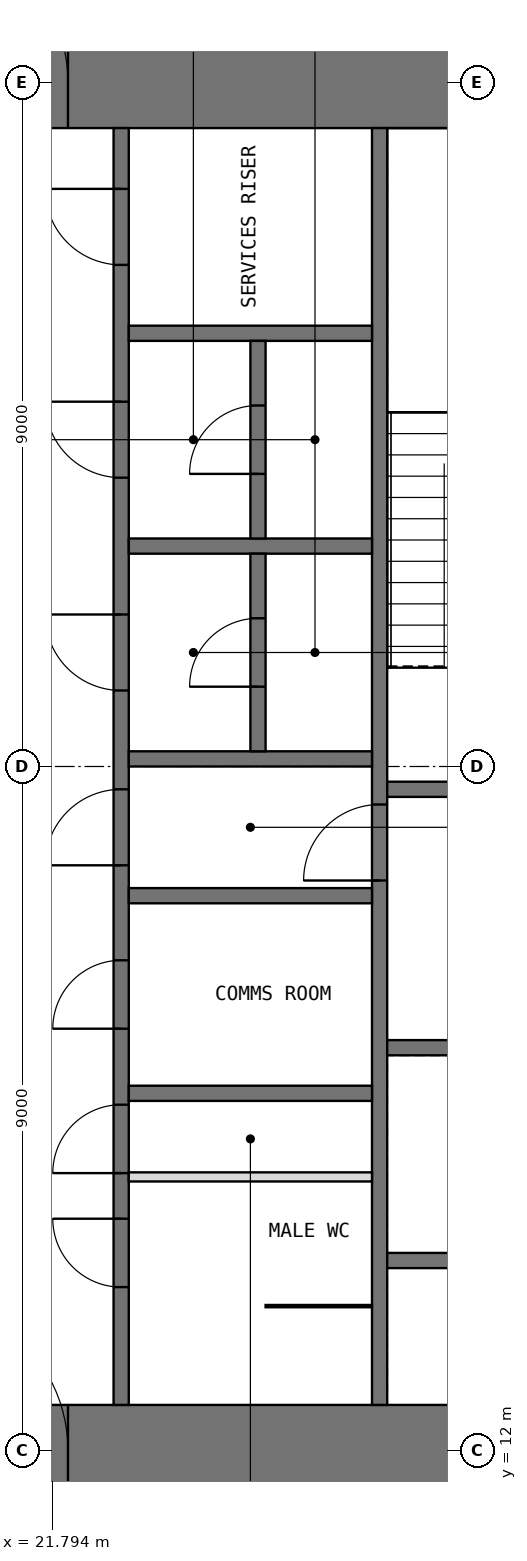
"""IFC4 building model, lengths in metres.
Left out: names, types, materials, properties, quantities, classifications, styles, units other than length and angle.
Written with IfcOpenShell. Run it as: python <this file> out.ifc"""

import sys

from ifc_helpers import new_model, si_unit, direction, frame, frame_2d, origin, place, context, subcontext, project, spatial, rectangle, extrude, element, fill, save


model = new_model("IFC4")
c1 = context("Model", 3, precision=1e-05, world=origin(), true_north=direction((0.0, 1.0)))
c2 = subcontext(c1, "Body", "Model", "MODEL_VIEW")
j1 = project(units=[si_unit("LENGTHUNIT", "METRE"), si_unit("PLANEANGLEUNIT", "RADIAN")], contexts=[c1])
p1 = place(None, origin())
s1 = spatial("IfcSite", under=j1, at=p1, CompositionType="ELEMENT")
p2 = place(p1, origin())
s2 = spatial("IfcBuilding", under=s1, at=p2, CompositionType="ELEMENT")
p3 = place(p2, frame((0.0, 0.0, 244.0)))
s3 = spatial("IfcBuildingStorey", under=s2, at=p3, CompositionType="ELEMENT", Elevation=244.0)
p4 = place(p3, frame((11.4, 12.0, -0.05), z_axis=(0.0, 0.0, 1.0), x_axis=(1.0, 0.0, 0.0)))
e1 = element("IfcWall", 1, at=p4, inside=s3, PredefinedType="SHEAR", context=c2, shape_type="SweptSolid", body=[
    extrude(rectangle(XDim=19.2, YDim=1.2, at=frame_2d((9.6, 0.0))), origin(), (0.0, 0.0, 1.0), 4.2),
])
p5 = place(p4, frame((8.6, 0.0, 0.05)))
e2 = element("IfcOpeningElement", 2, at=p5, cuts=e1, PredefinedType="OPENING", context=c2, shape_type="SweptSolid", body=[
    extrude(rectangle(XDim=2.0, YDim=2.2, at=frame_2d((1.0, 1.1))), frame((0.0, 0.61, 0.0), z_axis=(0.0, -1.0, 0.0), x_axis=(1.0, 0.0, 0.0)), (0.0, 0.0, 1.0), 1.22),
])
p6 = place(p3, frame((11.4, 30.0, -0.05), z_axis=(0.0, 0.0, 1.0), x_axis=(1.0, 0.0, 0.0)))
e3 = element("IfcWall", 3, at=p6, inside=s3, PredefinedType="SHEAR", context=c2, shape_type="SweptSolid", body=[
    extrude(rectangle(XDim=19.2, YDim=1.2, at=frame_2d((9.6, 0.0))), origin(), (0.0, 0.0, 1.0), 4.2),
])
p7 = place(p6, frame((8.6, 0.0, 0.05)))
e4 = element("IfcOpeningElement", 4, at=p7, cuts=e3, PredefinedType="OPENING", context=c2, shape_type="SweptSolid", body=[
    extrude(rectangle(XDim=2.0, YDim=2.2, at=frame_2d((1.0, 1.1))), frame((0.0, 0.61, 0.0), z_axis=(0.0, -1.0, 0.0), x_axis=(1.0, 0.0, 0.0)), (0.0, 0.0, 1.0), 1.22),
])
p8 = place(p3, frame((22.7, 12.6, -0.05), z_axis=(0.0, 0.0, 1.0), x_axis=(0.0, 1.0, 0.0)))
e5 = element("IfcWall", 5, at=p8, inside=s3, PredefinedType="SHEAR", context=c2, shape_type="SweptSolid", body=[
    extrude(rectangle(XDim=16.8, YDim=0.2, at=frame_2d((8.4, 0.0))), origin(), (0.0, 0.0, 1.0), 4.2),
])
p9 = place(p8, frame((3.05, 0.0, 0.05)))
e6 = element("IfcOpeningElement", 6, at=p9, cuts=e5, PredefinedType="OPENING", context=c2, shape_type="SweptSolid", body=[
    extrude(rectangle(XDim=0.9, YDim=2.2, at=frame_2d((0.45, 1.1))), frame((0.0, 0.11, 0.0), z_axis=(0.0, -1.0, 0.0), x_axis=(1.0, 0.0, 0.0)), (0.0, 0.0, 1.0), 0.22),
])
p10 = place(p8, frame((7.1, 0.0, 0.05)))
e7 = element("IfcOpeningElement", 7, at=p10, cuts=e5, PredefinedType="OPENING", context=c2, shape_type="SweptSolid", body=[
    extrude(rectangle(XDim=1.0, YDim=2.2, at=frame_2d((0.5, 1.1))), frame((0.0, 0.11, 0.0), z_axis=(0.0, -1.0, 0.0), x_axis=(1.0, 0.0, 0.0)), (0.0, 0.0, 1.0), 0.22),
])
p11 = place(p8, frame((1.55, 0.0, 0.05)))
e8 = element("IfcOpeningElement", 8, at=p11, cuts=e5, PredefinedType="OPENING", context=c2, shape_type="SweptSolid", body=[
    extrude(rectangle(XDim=0.9, YDim=2.2, at=frame_2d((0.45, 1.1))), frame((0.0, 0.11, 0.0), z_axis=(0.0, -1.0, 0.0), x_axis=(1.0, 0.0, 0.0)), (0.0, 0.0, 1.0), 0.22),
])
p12 = place(p8, frame((4.95, 0.0, 0.05)))
e9 = element("IfcOpeningElement", 9, at=p12, cuts=e5, PredefinedType="OPENING", context=c2, shape_type="SweptSolid", body=[
    extrude(rectangle(XDim=0.9, YDim=2.2, at=frame_2d((0.45, 1.1))), frame((0.0, 0.11, 0.0), z_axis=(0.0, -1.0, 0.0), x_axis=(1.0, 0.0, 0.0)), (0.0, 0.0, 1.0), 0.22),
])
p13 = place(p8, frame((9.4, 0.0, 0.05)))
e10 = element("IfcOpeningElement", 10, at=p13, cuts=e5, PredefinedType="OPENING", context=c2, shape_type="SweptSolid", body=[
    extrude(rectangle(XDim=1.0, YDim=2.2, at=frame_2d((0.5, 1.1))), frame((0.0, 0.11, 0.0), z_axis=(0.0, -1.0, 0.0), x_axis=(1.0, 0.0, 0.0)), (0.0, 0.0, 1.0), 0.22),
])
p14 = place(p8, frame((12.2, 0.0, 0.05)))
e11 = element("IfcOpeningElement", 11, at=p14, cuts=e5, PredefinedType="OPENING", context=c2, shape_type="SweptSolid", body=[
    extrude(rectangle(XDim=1.0, YDim=2.2, at=frame_2d((0.5, 1.1))), frame((0.0, 0.11, 0.0), z_axis=(0.0, -1.0, 0.0), x_axis=(1.0, 0.0, 0.0)), (0.0, 0.0, 1.0), 0.22),
])
p15 = place(p8, frame((15.0, 0.0, 0.05)))
e12 = element("IfcOpeningElement", 12, at=p15, cuts=e5, PredefinedType="OPENING", context=c2, shape_type="SweptSolid", body=[
    extrude(rectangle(XDim=1.0, YDim=2.2, at=frame_2d((0.5, 1.1))), frame((0.0, 0.11, 0.0), z_axis=(0.0, -1.0, 0.0), x_axis=(1.0, 0.0, 0.0)), (0.0, 0.0, 1.0), 0.22),
])
p16 = place(p3, frame((26.1, 12.6, -0.05), z_axis=(0.0, 0.0, 1.0), x_axis=(0.0, 1.0, 0.0)))
e13 = element("IfcWall", 13, at=p16, inside=s3, PredefinedType="SHEAR", context=c2, shape_type="SweptSolid", body=[
    extrude(rectangle(XDim=16.8, YDim=0.2, at=frame_2d((8.4, 0.0))), origin(), (0.0, 0.0, 1.0), 4.2),
])
p17 = place(p16, frame((6.9, 0.0, 0.05)))
e14 = element("IfcOpeningElement", 14, at=p17, cuts=e13, PredefinedType="OPENING", context=c2, shape_type="SweptSolid", body=[
    extrude(rectangle(XDim=1.0, YDim=2.2, at=frame_2d((0.5, 1.1))), frame((0.0, 0.11, 0.0), z_axis=(0.0, -1.0, 0.0), x_axis=(1.0, 0.0, 0.0)), (0.0, 0.0, 1.0), 0.22),
])
for number, where, z_axis, x_axis in (
    (15, (22.8, 16.7, -0.05), (0.0, 0.0, 1.0), (1.0, 0.0, 0.0)),
    (16, (22.8, 19.3, -0.05), (0.0, 0.0, 1.0), (1.0, 0.0, 0.0)),
    (17, (22.8, 21.1, -0.05), (0.0, 0.0, 1.0), (1.0, 0.0, 0.0)),
    (18, (22.8, 23.9, -0.05), (0.0, 0.0, 1.0), (1.0, 0.0, 0.0)),
    (19, (22.8, 26.7, -0.05), (0.0, 0.0, 1.0), (1.0, 0.0, 0.0)),
    (20, (26.2, 14.5, -0.05), (0.0, 0.0, 1.0), (1.0, 0.0, 0.0)),
):
    element("IfcWall", number, at=place(p3, frame(where, z_axis=z_axis, x_axis=x_axis)), inside=s3, PredefinedType="SHEAR", context=c2, shape_type="SweptSolid", body=[
        extrude(rectangle(XDim=3.2, YDim=0.2, at=frame_2d((1.6, 0.0))), origin(), (0.0, 0.0, 1.0), 4.2),
    ])
p18 = place(p3, frame((26.2, 17.3, -0.05), z_axis=(0.0, 0.0, 1.0), x_axis=(1.0, 0.0, 0.0)))
e21 = element("IfcWall", 21, at=p18, inside=s3, PredefinedType="SHEAR", context=c2, shape_type="SweptSolid", body=[
    extrude(rectangle(XDim=3.2, YDim=0.2, at=frame_2d((1.6, 0.0))), origin(), (0.0, 0.0, 1.0), 4.2),
])
p19 = place(p18, frame((1.0, 0.0, 0.05)))
e22 = element("IfcOpeningElement", 22, at=p19, cuts=e21, PredefinedType="OPENING", context=c2, shape_type="SweptSolid", body=[
    extrude(rectangle(XDim=1.2, YDim=2.2, at=frame_2d((0.6, 1.1))), frame((0.0, 0.11, 0.0), z_axis=(0.0, -1.0, 0.0), x_axis=(1.0, 0.0, 0.0)), (0.0, 0.0, 1.0), 0.22),
])
p20 = place(p3, frame((26.2, 20.7, -0.05), z_axis=(0.0, 0.0, 1.0), x_axis=(1.0, 0.0, 0.0)))
e23 = element("IfcWall", 23, at=p20, inside=s3, PredefinedType="SHEAR", context=c2, shape_type="SweptSolid", body=[
    extrude(rectangle(XDim=3.2, YDim=0.2, at=frame_2d((1.6, 0.0))), origin(), (0.0, 0.0, 1.0), 4.2),
])
p21 = place(p20, frame((1.1, 0.0, 0.05)))
e24 = element("IfcOpeningElement", 24, at=p21, cuts=e23, PredefinedType="OPENING", context=c2, shape_type="SweptSolid", body=[
    extrude(rectangle(XDim=1.0, YDim=2.2, at=frame_2d((0.5, 1.1))), frame((0.0, 0.11, 0.0), z_axis=(0.0, -1.0, 0.0), x_axis=(1.0, 0.0, 0.0)), (0.0, 0.0, 1.0), 0.22),
])
p22 = place(p3, frame((22.8, 15.6, 0.0), z_axis=(0.0, 0.0, 1.0), x_axis=(1.0, 0.0, 0.0)))
e25 = element("IfcWall", 25, at=p22, inside=s3, PredefinedType="PARTITIONING", context=c2, shape_type="SweptSolid", body=[
    extrude(rectangle(XDim=3.2, YDim=0.12, at=frame_2d((1.6, 0.0))), origin(), (0.0, 0.0, 1.0), 3.95),
])
p23 = place(p3, frame((24.6, 13.9, 0.0), z_axis=(0.0, 0.0, 1.0), x_axis=(1.0, 0.0, 0.0)))
e26 = element("IfcWall", 26, at=p23, inside=s3, PredefinedType="PARTITIONING", context=c2, shape_type="SweptSolid", body=[
    extrude(rectangle(XDim=1.4, YDim=0.03, at=frame_2d((0.7, 0.0))), origin(), (0.0, 0.0, 1.0), 3.95),
])
p24 = place(p3, frame((24.5, 21.2, -0.05), z_axis=(0.0, 0.0, 1.0), x_axis=(0.0, 1.0, 0.0)))
e27 = element("IfcWall", 27, at=p24, inside=s3, PredefinedType="SHEAR", context=c2, shape_type="SweptSolid", body=[
    extrude(rectangle(XDim=2.6, YDim=0.2, at=frame_2d((1.3, 0.0))), origin(), (0.0, 0.0, 1.0), 4.2),
])
p25 = place(p24, frame((0.85, 0.0, 0.05)))
e28 = element("IfcOpeningElement", 28, at=p25, cuts=e27, PredefinedType="OPENING", context=c2, shape_type="SweptSolid", body=[
    extrude(rectangle(XDim=0.9, YDim=2.2, at=frame_2d((0.45, 1.1))), frame((0.0, 0.11, 0.0), z_axis=(0.0, -1.0, 0.0), x_axis=(1.0, 0.0, 0.0)), (0.0, 0.0, 1.0), 0.22),
])
p26 = place(p3, frame((24.5, 24.0, -0.05), z_axis=(0.0, 0.0, 1.0), x_axis=(0.0, 1.0, 0.0)))
e29 = element("IfcWall", 29, at=p26, inside=s3, PredefinedType="SHEAR", context=c2, shape_type="SweptSolid", body=[
    extrude(rectangle(XDim=2.6, YDim=0.2, at=frame_2d((1.3, 0.0))), origin(), (0.0, 0.0, 1.0), 4.2),
])
p27 = place(p26, frame((0.85, 0.0, 0.05)))
e30 = element("IfcOpeningElement", 30, at=p27, cuts=e29, PredefinedType="OPENING", context=c2, shape_type="SweptSolid", body=[
    extrude(rectangle(XDim=0.9, YDim=2.2, at=frame_2d((0.45, 1.1))), frame((0.0, 0.11, 0.0), z_axis=(0.0, -1.0, 0.0), x_axis=(1.0, 0.0, 0.0)), (0.0, 0.0, 1.0), 0.22),
])
p28 = place(p5, origin())
e31 = element("IfcDoor", 31, at=p28, inside=s3, OperationType="DOUBLE_DOOR_SINGLE_SWING", PredefinedType="DOOR", context=c2, shape_type="SweptSolid", body=[
    extrude(rectangle(XDim=2.0, YDim=2.2, at=frame_2d((1.0, 1.1))), frame((0.0, 0.025, 0.0), z_axis=(0.0, -1.0, 0.0), x_axis=(1.0, 0.0, 0.0)), (0.0, 0.0, 1.0), 0.05),
])
fill(e2, e31)
p29 = place(p7, origin())
e32 = element("IfcDoor", 32, at=p29, inside=s3, OperationType="DOUBLE_DOOR_SINGLE_SWING", PredefinedType="DOOR", context=c2, shape_type="SweptSolid", body=[
    extrude(rectangle(XDim=2.0, YDim=2.2, at=frame_2d((1.0, 1.1))), frame((0.0, 0.025, 0.0), z_axis=(0.0, -1.0, 0.0), x_axis=(1.0, 0.0, 0.0)), (0.0, 0.0, 1.0), 0.05),
])
fill(e4, e32)
p30 = place(p9, origin())
e33 = element("IfcDoor", 33, at=p30, inside=s3, OperationType="SINGLE_SWING_LEFT", PredefinedType="DOOR", context=c2, shape_type="SweptSolid", body=[
    extrude(rectangle(XDim=0.9, YDim=2.2, at=frame_2d((0.45, 1.1))), frame((0.0, 0.025, 0.0), z_axis=(0.0, -1.0, 0.0), x_axis=(1.0, 0.0, 0.0)), (0.0, 0.0, 1.0), 0.05),
])
fill(e6, e33)
p31 = place(p17, origin())
e34 = element("IfcDoor", 34, at=p31, inside=s3, OperationType="SINGLE_SWING_LEFT", PredefinedType="DOOR", context=c2, shape_type="SweptSolid", body=[
    extrude(rectangle(XDim=1.0, YDim=2.2, at=frame_2d((0.5, 1.1))), frame((0.0, 0.025, 0.0), z_axis=(0.0, -1.0, 0.0), x_axis=(1.0, 0.0, 0.0)), (0.0, 0.0, 1.0), 0.05),
])
fill(e14, e34)
p32 = place(p10, origin())
e35 = element("IfcDoor", 35, at=p32, inside=s3, OperationType="SINGLE_SWING_LEFT", PredefinedType="DOOR", context=c2, shape_type="SweptSolid", body=[
    extrude(rectangle(XDim=1.0, YDim=2.2, at=frame_2d((0.5, 1.1))), frame((0.0, 0.025, 0.0), z_axis=(0.0, -1.0, 0.0), x_axis=(1.0, 0.0, 0.0)), (0.0, 0.0, 1.0), 0.05),
])
fill(e7, e35)
p33 = place(p11, origin())
e36 = element("IfcDoor", 36, at=p33, inside=s3, OperationType="SINGLE_SWING_RIGHT", PredefinedType="DOOR", context=c2, shape_type="SweptSolid", body=[
    extrude(rectangle(XDim=0.9, YDim=2.2, at=frame_2d((0.45, 1.1))), frame((0.0, 0.025, 0.0), z_axis=(0.0, -1.0, 0.0), x_axis=(1.0, 0.0, 0.0)), (0.0, 0.0, 1.0), 0.05),
])
fill(e8, e36)
p34 = place(p12, origin())
e37 = element("IfcDoor", 37, at=p34, inside=s3, OperationType="SINGLE_SWING_LEFT", PredefinedType="DOOR", context=c2, shape_type="SweptSolid", body=[
    extrude(rectangle(XDim=0.9, YDim=2.2, at=frame_2d((0.45, 1.1))), frame((0.0, 0.025, 0.0), z_axis=(0.0, -1.0, 0.0), x_axis=(1.0, 0.0, 0.0)), (0.0, 0.0, 1.0), 0.05),
])
fill(e9, e37)
p35 = place(p13, origin())
e38 = element("IfcDoor", 38, at=p35, inside=s3, OperationType="SINGLE_SWING_RIGHT", PredefinedType="DOOR", context=c2, shape_type="SweptSolid", body=[
    extrude(rectangle(XDim=1.0, YDim=2.2, at=frame_2d((0.5, 1.1))), frame((0.0, 0.025, 0.0), z_axis=(0.0, -1.0, 0.0), x_axis=(1.0, 0.0, 0.0)), (0.0, 0.0, 1.0), 0.05),
])
fill(e10, e38)
p36 = place(p25, origin())
e39 = element("IfcDoor", 39, at=p36, inside=s3, OperationType="SINGLE_SWING_LEFT", PredefinedType="DOOR", context=c2, shape_type="SweptSolid", body=[
    extrude(rectangle(XDim=0.9, YDim=2.2, at=frame_2d((0.45, 1.1))), frame((0.0, 0.025, 0.0), z_axis=(0.0, -1.0, 0.0), x_axis=(1.0, 0.0, 0.0)), (0.0, 0.0, 1.0), 0.05),
])
fill(e28, e39)
p37 = place(p14, origin())
e40 = element("IfcDoor", 40, at=p37, inside=s3, OperationType="SINGLE_SWING_RIGHT", PredefinedType="DOOR", context=c2, shape_type="SweptSolid", body=[
    extrude(rectangle(XDim=1.0, YDim=2.2, at=frame_2d((0.5, 1.1))), frame((0.0, 0.025, 0.0), z_axis=(0.0, -1.0, 0.0), x_axis=(1.0, 0.0, 0.0)), (0.0, 0.0, 1.0), 0.05),
])
fill(e11, e40)
p38 = place(p27, origin())
e41 = element("IfcDoor", 41, at=p38, inside=s3, OperationType="SINGLE_SWING_LEFT", PredefinedType="DOOR", context=c2, shape_type="SweptSolid", body=[
    extrude(rectangle(XDim=0.9, YDim=2.2, at=frame_2d((0.45, 1.1))), frame((0.0, 0.025, 0.0), z_axis=(0.0, -1.0, 0.0), x_axis=(1.0, 0.0, 0.0)), (0.0, 0.0, 1.0), 0.05),
])
fill(e30, e41)
p39 = place(p15, origin())
e42 = element("IfcDoor", 42, at=p39, inside=s3, OperationType="SINGLE_SWING_RIGHT", PredefinedType="DOOR", context=c2, shape_type="SweptSolid", body=[
    extrude(rectangle(XDim=1.0, YDim=2.2, at=frame_2d((0.5, 1.1))), frame((0.0, 0.025, 0.0), z_axis=(0.0, -1.0, 0.0), x_axis=(1.0, 0.0, 0.0)), (0.0, 0.0, 1.0), 0.05),
])
fill(e12, e42)
save(model, sys.argv[1])
